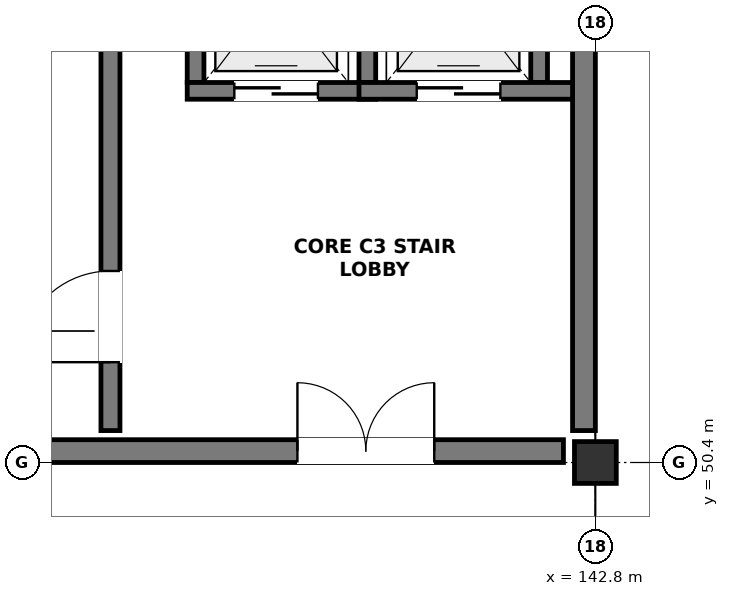
"""IFC4 building model, lengths in metres.
Left out: names, types, materials, properties, quantities, classifications, styles, units other than length and angle.
Written with IfcOpenShell. Run it as: python <this file> out.ifc"""

import sys

from ifc_helpers import new_model, si_unit, direction, frame, frame_2d, origin, origin_2d, place, context, subcontext, project, spatial, rectangle, extrude, element, fill, save


model = new_model("IFC4")
c1 = context("Model", 3, precision=1e-05, world=origin(), true_north=direction((0.0, 1.0)))
c2 = subcontext(c1, "Body", "Model", "MODEL_VIEW")
j1 = project(units=[si_unit("LENGTHUNIT", "METRE"), si_unit("PLANEANGLEUNIT", "RADIAN")], contexts=[c1])
p1 = place(None, origin())
s1 = spatial("IfcSite", under=j1, at=p1, CompositionType="ELEMENT")
p2 = place(p1, origin())
s2 = spatial("IfcBuilding", under=s1, at=p2, CompositionType="ELEMENT")
p3 = place(p2, frame((0.0, 0.0, 14.4)))
s3 = spatial("IfcBuildingStorey", under=s2, at=p3, CompositionType="ELEMENT", Elevation=14.4)
p4 = place(p3, frame((142.8, 50.4, 0.0), z_axis=(0.0, 0.0, 1.0), x_axis=(1.0, 0.0, 0.0)))
e1 = element("IfcColumn", 1, at=p4, inside=s3, PredefinedType="COLUMN", context=c2, shape_type="SweptSolid", body=[
    extrude(rectangle(XDim=0.55, YDim=0.55, at=origin_2d()), origin(), (0.0, 0.0, 1.0), 3.9),
])
p5 = place(p3, frame((126.45, 50.55, 0.0), z_axis=(0.0, 0.0, 1.0), x_axis=(1.0, 0.0, 0.0)))
e2 = element("IfcWall", 2, at=p5, inside=s3, PredefinedType="SHEAR", context=c2, shape_type="SweptSolid", body=[
    extrude(rectangle(XDim=15.93, YDim=0.3, at=frame_2d((7.965, 0.0))), origin(), (0.0, 0.0, 1.0), 3.62),
])
p6 = place(p5, frame((12.43, 0.0, 0.0)))
e3 = element("IfcOpeningElement", 3, at=p6, cuts=e2, PredefinedType="OPENING", context=c2, shape_type="SweptSolid", body=[
    extrude(rectangle(XDim=1.8, YDim=2.2, at=frame_2d((0.9, 1.1))), frame((0.0, 0.162, 0.0), z_axis=(0.0, -1.0, 0.0), x_axis=(1.0, 0.0, 0.0)), (0.0, 0.0, 1.0), 0.324),
])
p7 = place(p3, frame((142.65, 50.82, 0.0), z_axis=(0.0, 0.0, 1.0), x_axis=(0.0, 1.0, 0.0)))
e4 = element("IfcWall", 4, at=p7, inside=s3, PredefinedType="SHEAR", context=c2, shape_type="SweptSolid", body=[
    extrude(rectangle(XDim=7.56, YDim=0.3, at=frame_2d((3.78, 0.0))), origin(), (0.0, 0.0, 1.0), 3.62),
])
p8 = place(p3, frame((136.42, 50.82, 0.0), z_axis=(0.0, 0.0, 1.0), x_axis=(0.0, 1.0, 0.0)))
e5 = element("IfcWall", 5, at=p8, inside=s3, PredefinedType="SHEAR", context=c2, shape_type="SweptSolid", body=[
    extrude(rectangle(XDim=7.56, YDim=0.25, at=frame_2d((3.78, 0.0))), origin(), (0.0, 0.0, 1.0), 3.62),
])
p9 = place(p8, frame((0.9, 0.0, 0.0)))
e6 = element("IfcOpeningElement", 6, at=p9, cuts=e5, PredefinedType="OPENING", context=c2, shape_type="SweptSolid", body=[
    extrude(rectangle(XDim=1.2, YDim=2.2, at=frame_2d((0.6, 1.1))), frame((0.0, 0.137, 0.0), z_axis=(0.0, -1.0, 0.0), x_axis=(1.0, 0.0, 0.0)), (0.0, 0.0, 1.0), 0.274),
])
p10 = place(p3, frame((137.54, 55.4, 0.0), z_axis=(0.0, 0.0, 1.0), x_axis=(0.0, 1.0, 0.0)))
e7 = element("IfcWall", 7, at=p10, inside=s3, PredefinedType="SOLIDWALL", context=c2, shape_type="SweptSolid", body=[
    extrude(rectangle(XDim=2.4, YDim=0.22, at=frame_2d((1.2, 0.0))), origin(), (0.0, 0.0, 1.0), 3.62),
])
p11 = place(p3, frame((137.43, 55.29, 0.0), z_axis=(0.0, 0.0, 1.0), x_axis=(1.0, 0.0, 0.0)))
e8 = element("IfcWall", 8, at=p11, inside=s3, PredefinedType="SOLIDWALL", context=c2, shape_type="SweptSolid", body=[
    extrude(rectangle(XDim=2.48, YDim=0.22, at=frame_2d((1.24, 0.0))), origin(), (0.0, 0.0, 1.0), 3.62),
])
p12 = place(p11, frame((0.62, 0.0, 0.0)))
e9 = element("IfcOpeningElement", 9, at=p12, cuts=e8, PredefinedType="OPENING", context=c2, shape_type="SweptSolid", body=[
    extrude(rectangle(XDim=1.1, YDim=2.15, at=frame_2d((0.55, 1.075))), frame((0.0, 0.122, 0.0), z_axis=(0.0, -1.0, 0.0), x_axis=(1.0, 0.0, 0.0)), (0.0, 0.0, 1.0), 0.244),
])
for number, where, z_axis, x_axis in (
    (10, (139.8, 55.4, 0.0), (0.0, 0.0, 1.0), (0.0, 1.0, 0.0)),
    (11, (142.06, 55.4, 0.0), (0.0, 0.0, 1.0), (0.0, 1.0, 0.0)),
):
    element("IfcWall", number, at=place(p3, frame(where, z_axis=z_axis, x_axis=x_axis)), inside=s3, PredefinedType="SOLIDWALL", context=c2, shape_type="SweptSolid", body=[
        extrude(rectangle(XDim=2.4, YDim=0.22, at=frame_2d((1.2, 0.0))), origin(), (0.0, 0.0, 1.0), 3.62),
    ])
p13 = place(p3, frame((139.69, 55.29, 0.0), z_axis=(0.0, 0.0, 1.0), x_axis=(1.0, 0.0, 0.0)))
e12 = element("IfcWall", 12, at=p13, inside=s3, PredefinedType="SOLIDWALL", context=c2, shape_type="SweptSolid", body=[
    extrude(rectangle(XDim=2.81, YDim=0.22, at=frame_2d((1.405, 0.0))), origin(), (0.0, 0.0, 1.0), 3.62),
])
p14 = place(p13, frame((0.76, 0.0, 0.0)))
e13 = element("IfcOpeningElement", 13, at=p14, cuts=e12, PredefinedType="OPENING", context=c2, shape_type="SweptSolid", body=[
    extrude(rectangle(XDim=1.1, YDim=2.15, at=frame_2d((0.55, 1.075))), frame((0.0, 0.122, 0.0), z_axis=(0.0, -1.0, 0.0), x_axis=(1.0, 0.0, 0.0)), (0.0, 0.0, 1.0), 0.244),
])
p15 = place(p6, origin())
e14 = element("IfcDoor", 14, at=p15, inside=s3, OperationType="DOUBLE_DOOR_SINGLE_SWING", PredefinedType="DOOR", context=c2, shape_type="SweptSolid", body=[
    extrude(rectangle(XDim=1.8, YDim=2.2, at=frame_2d((0.9, 1.1))), frame((0.0, 0.025, 0.0), z_axis=(0.0, -1.0, 0.0), x_axis=(1.0, 0.0, 0.0)), (0.0, 0.0, 1.0), 0.05),
])
fill(e3, e14)
p16 = place(p9, origin())
e15 = element("IfcDoor", 15, at=p16, inside=s3, OperationType="SINGLE_SWING_LEFT", PredefinedType="DOOR", context=c2, shape_type="SweptSolid", body=[
    extrude(rectangle(XDim=1.2, YDim=2.2, at=frame_2d((0.6, 1.1))), frame((0.0, 0.025, 0.0), z_axis=(0.0, -1.0, 0.0), x_axis=(1.0, 0.0, 0.0)), (0.0, 0.0, 1.0), 0.05),
])
fill(e6, e15)
p17 = place(p12, origin())
e16 = element("IfcDoor", 16, at=p17, inside=s3, OperationType="DOUBLE_DOOR_SLIDING", PredefinedType="DOOR", context=c2, shape_type="SweptSolid", body=[
    extrude(rectangle(XDim=1.1, YDim=2.15, at=frame_2d((0.55, 1.075))), frame((0.0, 0.025, 0.0), z_axis=(0.0, -1.0, 0.0), x_axis=(1.0, 0.0, 0.0)), (0.0, 0.0, 1.0), 0.05),
])
fill(e9, e16)
p18 = place(p14, origin())
e17 = element("IfcDoor", 17, at=p18, inside=s3, OperationType="DOUBLE_DOOR_SLIDING", PredefinedType="DOOR", context=c2, shape_type="SweptSolid", body=[
    extrude(rectangle(XDim=1.1, YDim=2.15, at=frame_2d((0.55, 1.075))), frame((0.0, 0.025, 0.0), z_axis=(0.0, -1.0, 0.0), x_axis=(1.0, 0.0, 0.0)), (0.0, 0.0, 1.0), 0.05),
])
fill(e13, e17)
save(model, sys.argv[1])
